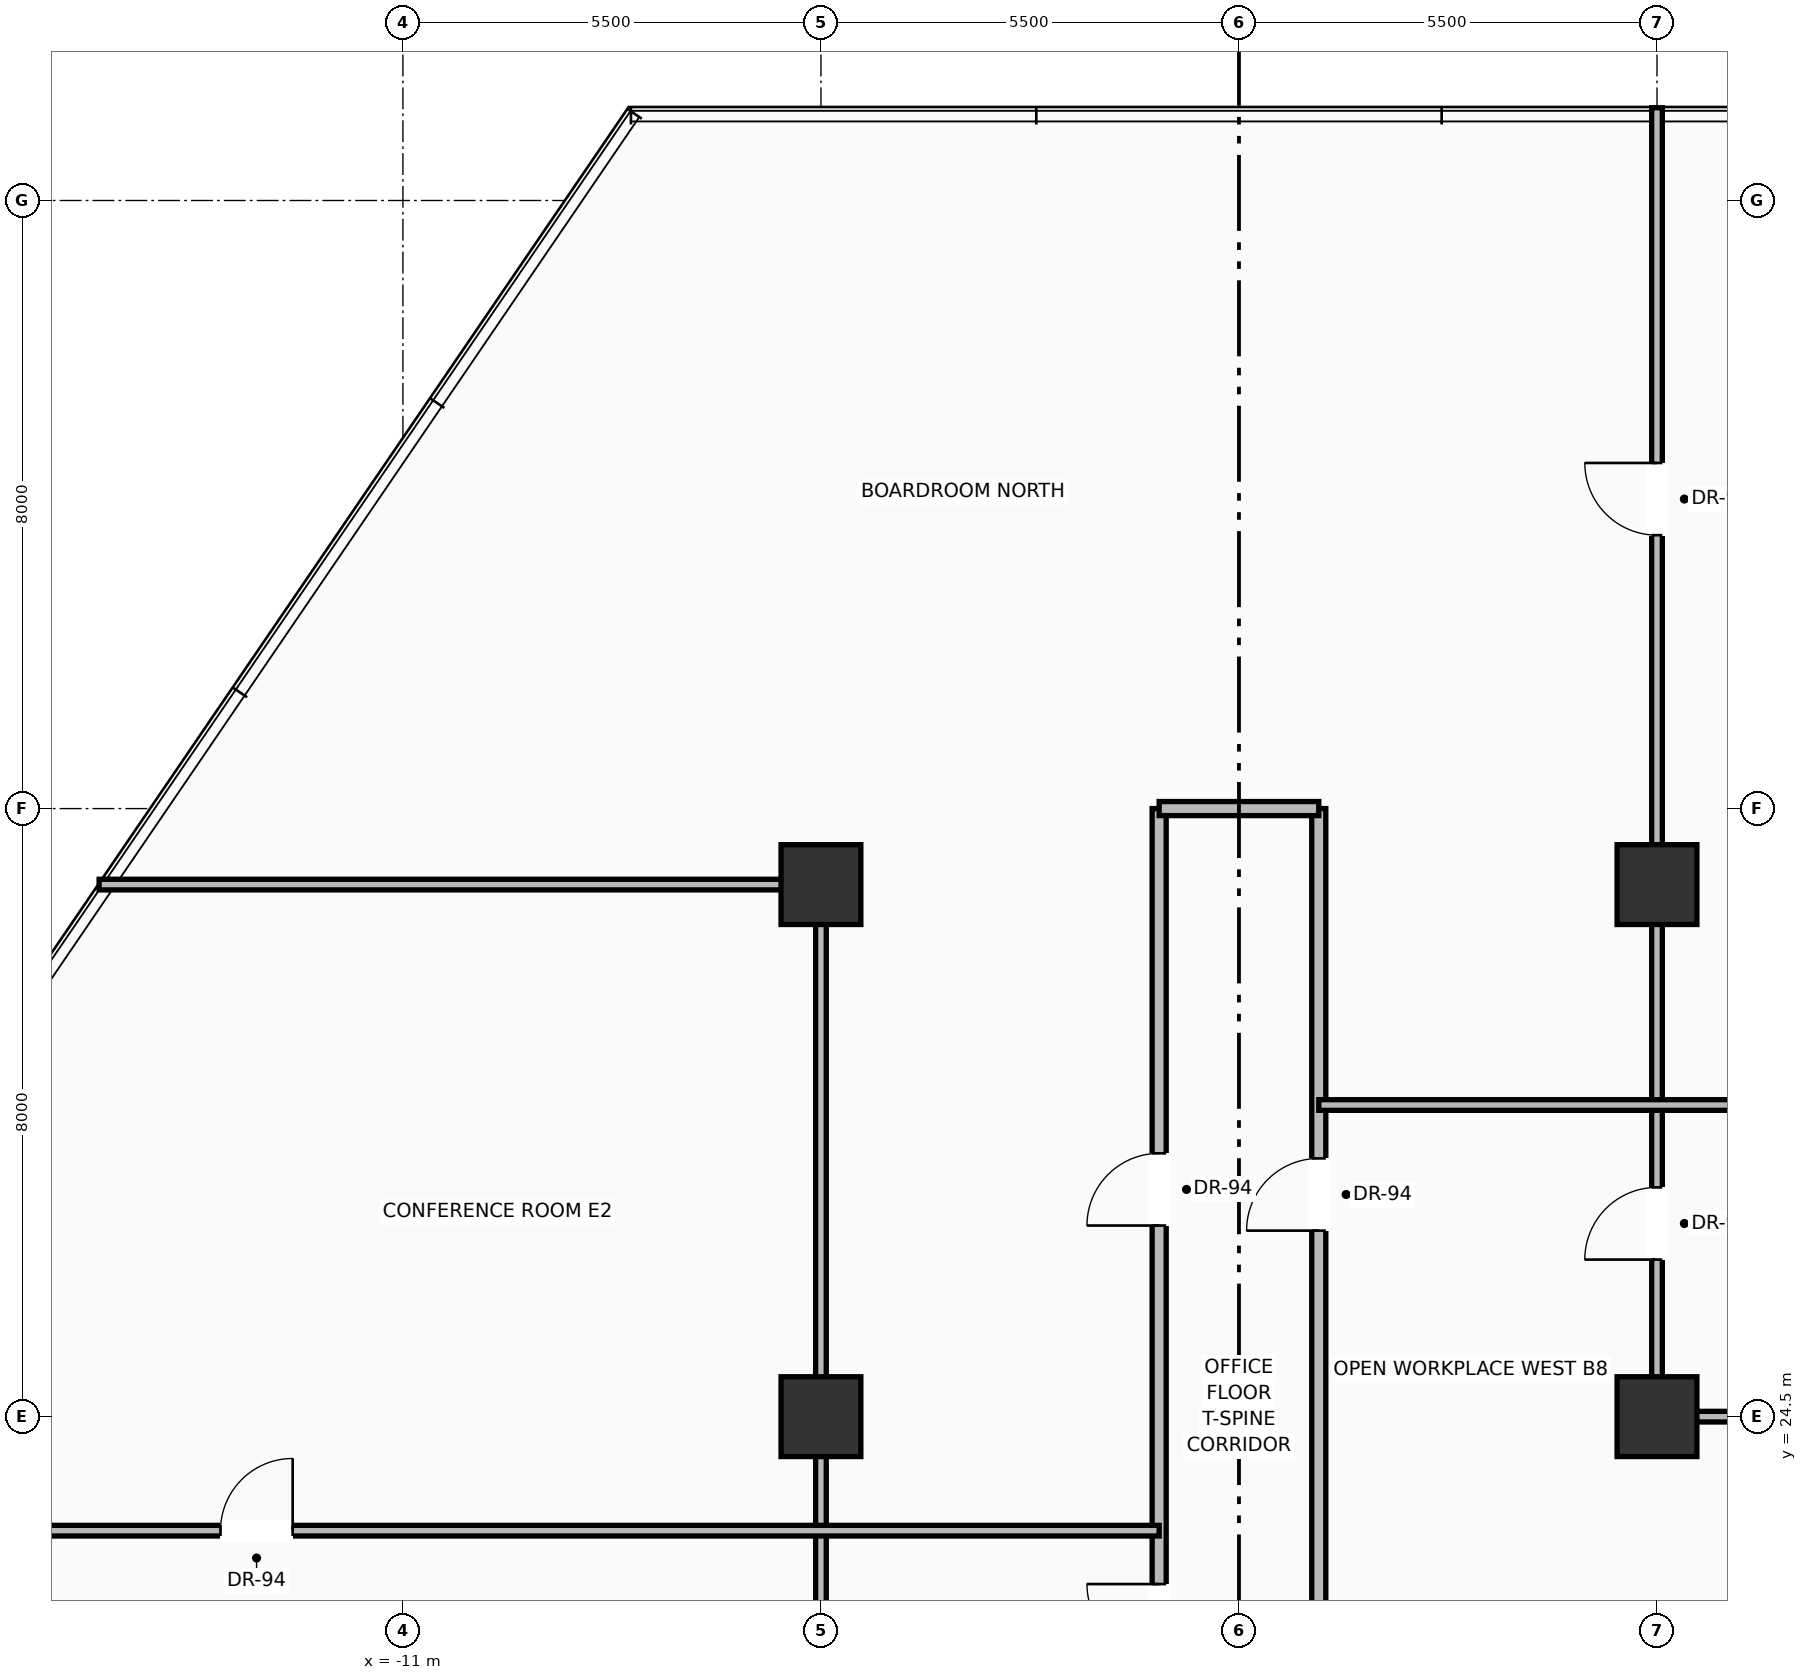
"""IFC4 building model, lengths in metres.
Left out: names, types, materials, properties, quantities, classifications, styles, units other than length and angle.
Written with IfcOpenShell. Run it as: python <this file> out.ifc"""

import sys

from ifc_helpers import new_model, si_unit, direction, frame, frame_2d, origin, origin_2d, place, context, subcontext, project, spatial, rectangle, extrude, source, transform, mapped, element, fill, save


model = new_model("IFC4")
c1 = context("Model", 3, precision=1e-05, world=origin(), true_north=direction((0.0, 1.0)))
c2 = subcontext(c1, "Body", "Model", "MODEL_VIEW")
j1 = project(units=[si_unit("LENGTHUNIT", "METRE"), si_unit("PLANEANGLEUNIT", "RADIAN")], contexts=[c1])
p1 = place(None, origin())
s1 = spatial("IfcSite", under=j1, at=p1, CompositionType="ELEMENT")
p2 = place(p1, origin())
s2 = spatial("IfcBuilding", under=s1, at=p2, CompositionType="ELEMENT")
p3 = place(p2, frame((0.0, 0.0, 27.5)))
s3 = spatial("IfcBuildingStorey", under=s2, at=p3, CompositionType="ELEMENT", Elevation=27.5)
m1 = source(origin(), c2, "Body", "SweptSolid", [
    extrude(rectangle(XDim=1.05, YDim=1.05, at=origin_2d()), origin(), (0.0, 0.0, 1.0), 3.7),
])
for number, where, z_axis, x_axis in (
    (1, (-5.5, 24.5, 0.0), (0.0, 0.0, 1.0), (1.0, 0.0, 0.0)),
    (2, (5.5, 24.5, 0.0), (0.0, 0.0, 1.0), (1.0, 0.0, 0.0)),
    (3, (-5.5, 31.5, 0.0), (0.0, 0.0, 1.0), (1.0, 0.0, 0.0)),
    (4, (5.5, 31.5, 0.0), (0.0, 0.0, 1.0), (1.0, 0.0, 0.0)),
):
    element("IfcColumn", number, at=place(p3, frame(where, z_axis=z_axis, x_axis=x_axis)), inside=s3, PredefinedType="COLUMN", context=c2, shape_type="MappedRepresentation", body=[
        mapped(m1, transform((0.0, 0.0, 0.0), scale=1.0)),
    ])
p4 = place(p3, frame((-1.05, 18.45, 0.0), z_axis=(0.0, 0.0, 1.0), x_axis=(0.0, 1.0, 0.0)))
e5 = element("IfcWall", 5, at=p4, inside=s3, PredefinedType="PARTITIONING", context=c2, shape_type="SweptSolid", body=[
    extrude(rectangle(XDim=14.05, YDim=0.185, at=frame_2d((7.025, 0.0))), origin(), (0.0, 0.0, 1.0), 2.747),
])
p5 = place(p4, frame((2.897, 0.0, 0.0)))
e6 = element("IfcOpeningElement", 6, at=p5, cuts=e5, PredefinedType="OPENING", context=c2, shape_type="SweptSolid", body=[
    extrude(rectangle(XDim=0.95, YDim=2.2, at=frame_2d((0.475, 1.1))), frame((0.0, 0.103, 0.0), z_axis=(0.0, -1.0, 0.0), x_axis=(1.0, 0.0, 0.0)), (0.0, 0.0, 1.0), 0.205),
])
p6 = place(p4, frame((8.564, 0.0, 0.0)))
e7 = element("IfcOpeningElement", 7, at=p6, cuts=e5, PredefinedType="OPENING", context=c2, shape_type="SweptSolid", body=[
    extrude(rectangle(XDim=0.95, YDim=2.2, at=frame_2d((0.475, 1.1))), frame((0.0, 0.103, 0.0), z_axis=(0.0, -1.0, 0.0), x_axis=(1.0, 0.0, 0.0)), (0.0, 0.0, 1.0), 0.205),
])
p7 = place(p3, frame((1.05, 18.45, 0.0), z_axis=(0.0, 0.0, 1.0), x_axis=(0.0, 1.0, 0.0)))
e8 = element("IfcWall", 8, at=p7, inside=s3, PredefinedType="PARTITIONING", context=c2, shape_type="SweptSolid", body=[
    extrude(rectangle(XDim=14.05, YDim=0.185, at=frame_2d((7.025, 0.0))), origin(), (0.0, 0.0, 1.0), 2.747),
])
p8 = place(p7, frame((8.498, 0.0, 0.0)))
e9 = element("IfcOpeningElement", 9, at=p8, cuts=e8, PredefinedType="OPENING", context=c2, shape_type="SweptSolid", body=[
    extrude(rectangle(XDim=0.95, YDim=2.2, at=frame_2d((0.475, 1.1))), frame((0.0, 0.103, 0.0), z_axis=(0.0, -1.0, 0.0), x_axis=(1.0, 0.0, 0.0)), (0.0, 0.0, 1.0), 0.205),
])
p9 = place(p3, frame((-1.05, 32.5, 0.0), z_axis=(0.0, 0.0, 1.0), x_axis=(1.0, 0.0, 0.0)))
e10 = element("IfcWall", 10, at=p9, inside=s3, PredefinedType="PARTITIONING", context=c2, shape_type="SweptSolid", body=[
    extrude(rectangle(XDim=2.1, YDim=0.185, at=frame_2d((1.05, 0.0))), origin(), (0.0, 0.0, 1.0), 3.442),
])
p10 = place(p3, frame((-5.5, 18.3, 0.0), z_axis=(0.0, 0.0, 1.0), x_axis=(0.0, 1.0, 0.0)))
e11 = element("IfcWall", 11, at=p10, inside=s3, PredefinedType="PARTITIONING", context=c2, shape_type="SweptSolid", body=[
    extrude(rectangle(XDim=13.2, YDim=0.14, at=frame_2d((6.6, 0.0))), origin(), (0.0, 0.0, 1.0), 2.747),
])
p11 = place(p3, frame((5.5, 24.5, 0.0), z_axis=(0.0, 0.0, 1.0), x_axis=(0.0, 1.0, 0.0)))
e12 = element("IfcWall", 12, at=p11, inside=s3, PredefinedType="PARTITIONING", context=c2, shape_type="SweptSolid", body=[
    extrude(rectangle(XDim=17.22, YDim=0.14, at=frame_2d((8.61, 0.0))), origin(), (0.0, 0.0, 1.0), 2.747),
])
p12 = place(p11, frame((2.066, 0.0, 0.0)))
e13 = element("IfcOpeningElement", 13, at=p12, cuts=e12, PredefinedType="OPENING", context=c2, shape_type="SweptSolid", body=[
    extrude(rectangle(XDim=0.95, YDim=2.2, at=frame_2d((0.475, 1.1))), frame((0.0, 0.08, 0.0), z_axis=(0.0, -1.0, 0.0), x_axis=(1.0, 0.0, 0.0)), (0.0, 0.0, 1.0), 0.16),
])
p13 = place(p11, frame((11.597, 0.0, 0.0)))
e14 = element("IfcOpeningElement", 14, at=p13, cuts=e12, PredefinedType="OPENING", context=c2, shape_type="SweptSolid", body=[
    extrude(rectangle(XDim=0.95, YDim=2.2, at=frame_2d((0.475, 1.1))), frame((0.0, 0.08, 0.0), z_axis=(0.0, -1.0, 0.0), x_axis=(1.0, 0.0, 0.0)), (0.0, 0.0, 1.0), 0.16),
])
p14 = place(p3, frame((-14.997, 31.5, 0.0), z_axis=(0.0, 0.0, 1.0), x_axis=(1.0, 0.0, 0.0)))
e15 = element("IfcWall", 15, at=p14, inside=s3, PredefinedType="PARTITIONING", context=c2, shape_type="SweptSolid", body=[
    extrude(rectangle(XDim=9.497, YDim=0.14, at=frame_2d((4.749, 0.0))), origin(), (0.0, 0.0, 1.0), 2.747),
])
p15 = place(p3, frame((5.5, 24.5, 0.0), z_axis=(0.0, 0.0, 1.0), x_axis=(1.0, 0.0, 0.0)))
e16 = element("IfcWall", 16, at=p15, inside=s3, PredefinedType="PARTITIONING", context=c2, shape_type="SweptSolid", body=[
    extrude(rectangle(XDim=14.273, YDim=0.14, at=frame_2d((7.136, 0.0))), origin(), (0.0, 0.0, 1.0), 2.747),
])
p16 = place(p3, frame((-20.796, 23.0, 0.0), z_axis=(0.0, 0.0, 1.0), x_axis=(1.0, 0.0, 0.0)))
e17 = element("IfcWall", 17, at=p16, inside=s3, PredefinedType="PARTITIONING", context=c2, shape_type="SweptSolid", body=[
    extrude(rectangle(XDim=19.746, YDim=0.14, at=frame_2d((9.873, 0.0))), origin(), (0.0, 0.0, 1.0), 2.747),
])
p17 = place(p16, frame((7.396, 0.0, 0.0)))
e18 = element("IfcOpeningElement", 18, at=p17, cuts=e17, PredefinedType="OPENING", context=c2, shape_type="SweptSolid", body=[
    extrude(rectangle(XDim=0.95, YDim=2.2, at=frame_2d((0.475, 1.1))), frame((0.0, 0.08, 0.0), z_axis=(0.0, -1.0, 0.0), x_axis=(1.0, 0.0, 0.0)), (0.0, 0.0, 1.0), 0.16),
])
p18 = place(p3, frame((1.05, 28.6, 0.0), z_axis=(0.0, 0.0, 1.0), x_axis=(1.0, 0.0, 0.0)))
e19 = element("IfcWall", 19, at=p18, inside=s3, PredefinedType="PARTITIONING", context=c2, shape_type="SweptSolid", body=[
    extrude(rectangle(XDim=15.926, YDim=0.14, at=frame_2d((7.963, 0.0))), origin(), (0.0, 0.0, 1.0), 2.747),
])
m2 = source(origin(), c2, "Body", "SweptSolid", [
    extrude(rectangle(XDim=0.95, YDim=2.2, at=frame_2d((0.475, 1.1))), frame((0.0, 0.025, 0.0), z_axis=(0.0, -1.0, 0.0), x_axis=(1.0, 0.0, 0.0)), (0.0, 0.0, 1.0), 0.05),
])
p19 = place(p5, origin())
e20 = element("IfcDoor", 20, at=p19, inside=s3, OperationType="SINGLE_SWING_RIGHT", PredefinedType="DOOR", context=c2, shape_type="MappedRepresentation", body=[
    mapped(m2, transform((0.0, 0.0, 0.0), scale=1.0)),
])
fill(e6, e20)
p20 = place(p8, origin())
e21 = element("IfcDoor", 21, at=p20, inside=s3, OperationType="SINGLE_SWING_LEFT", PredefinedType="DOOR", context=c2, shape_type="MappedRepresentation", body=[
    mapped(m2, transform((0.0, 0.0, 0.0), scale=1.0)),
])
fill(e9, e21)
p21 = place(p12, origin())
e22 = element("IfcDoor", 22, at=p21, inside=s3, OperationType="SINGLE_SWING_LEFT", PredefinedType="DOOR", context=c2, shape_type="MappedRepresentation", body=[
    mapped(m2, transform((0.0, 0.0, 0.0), scale=1.0)),
])
fill(e13, e22)
p22 = place(p17, origin())
e23 = element("IfcDoor", 23, at=p22, inside=s3, OperationType="SINGLE_SWING_RIGHT", PredefinedType="DOOR", context=c2, shape_type="MappedRepresentation", body=[
    mapped(m2, transform((0.0, 0.0, 0.0), scale=1.0)),
])
fill(e18, e23)
p23 = place(p6, origin())
e24 = element("IfcDoor", 24, at=p23, inside=s3, OperationType="SINGLE_SWING_LEFT", PredefinedType="DOOR", context=c2, shape_type="MappedRepresentation", body=[
    mapped(m2, transform((0.0, 0.0, 0.0), scale=1.0)),
])
fill(e7, e24)
p24 = place(p13, origin())
e25 = element("IfcDoor", 25, at=p24, inside=s3, OperationType="SINGLE_SWING_RIGHT", PredefinedType="DOOR", context=c2, shape_type="MappedRepresentation", body=[
    mapped(m2, transform((0.0, 0.0, 0.0), scale=1.0)),
])
fill(e14, e25)
save(model, sys.argv[1])
